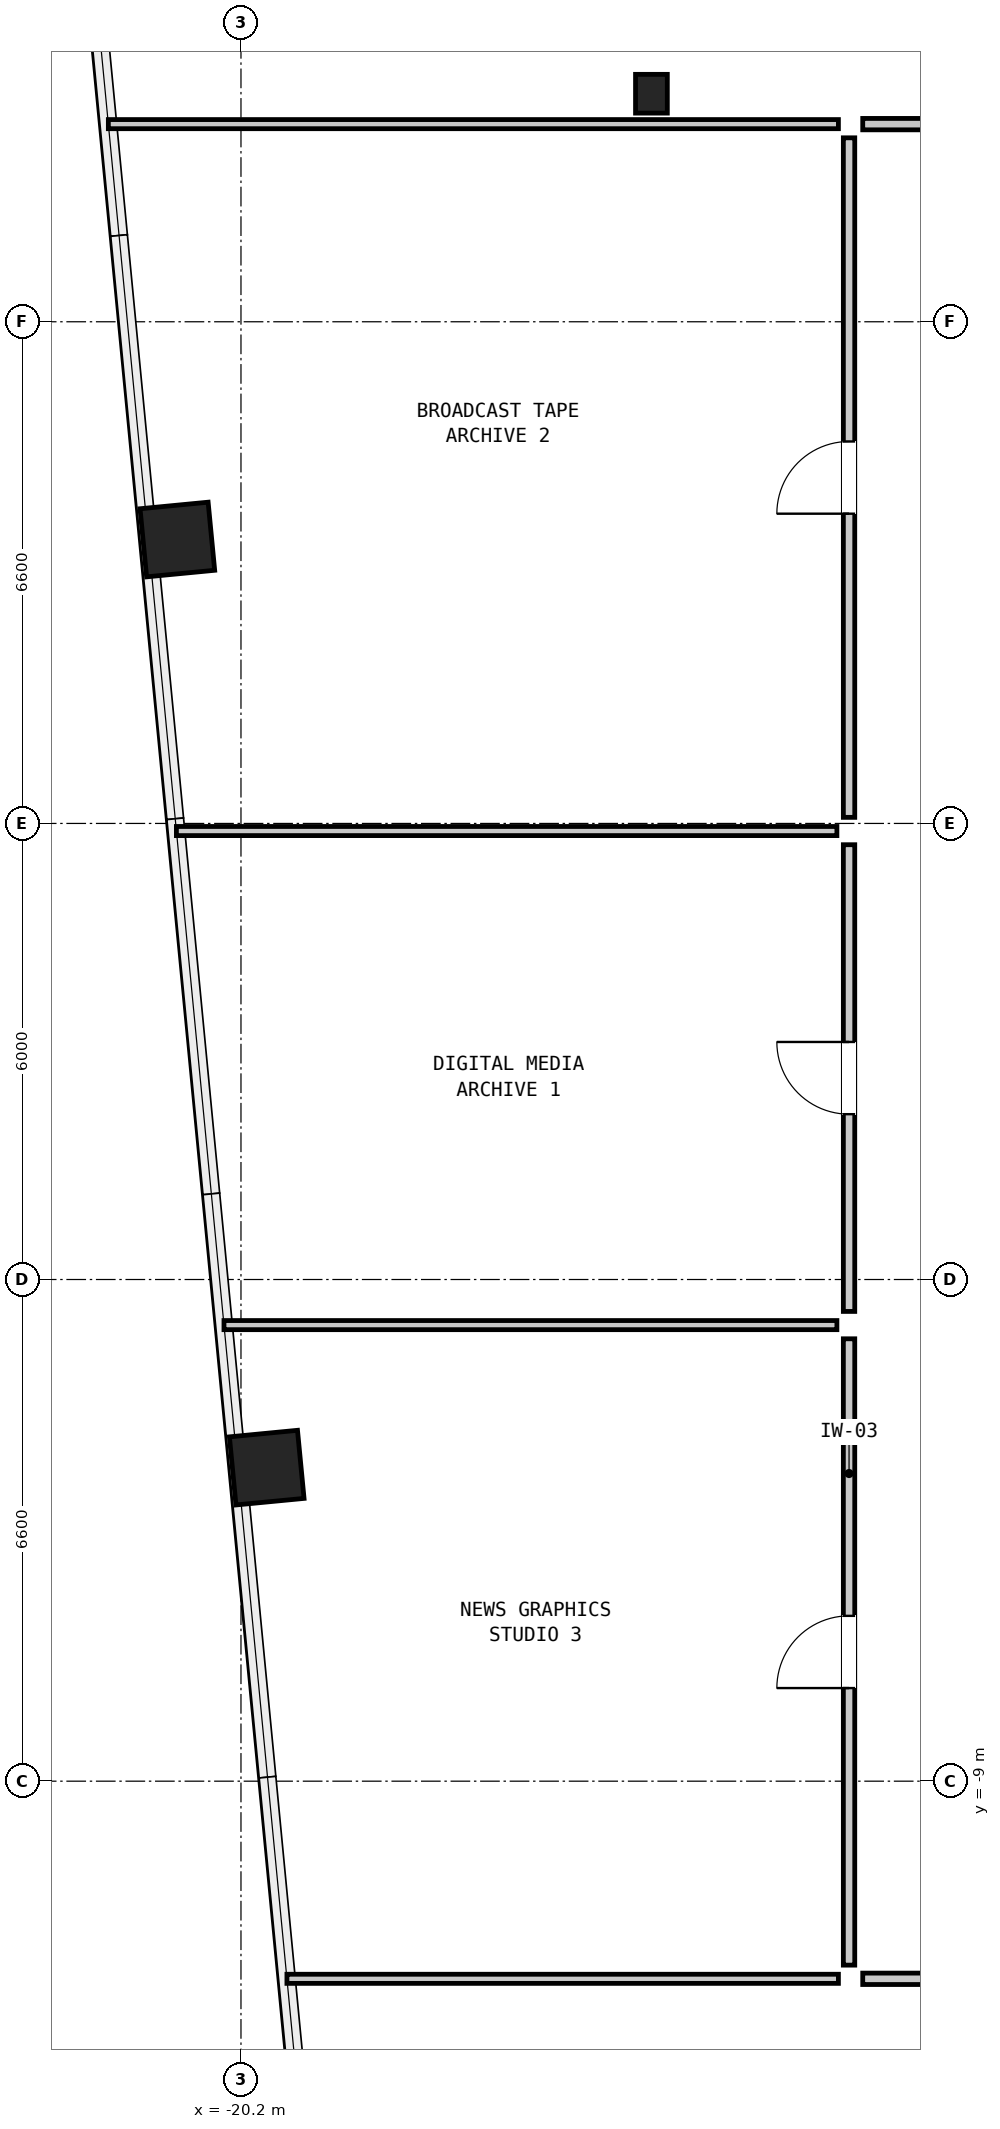
"""IFC4 building model, lengths in metres.
Left out: names, types, materials, properties, quantities, classifications, styles, units other than length and angle.
Written with IfcOpenShell. Run it as: python <this file> out.ifc"""

import sys

from ifc_helpers import new_model, si_unit, direction, frame, frame_2d, origin, origin_2d, place, context, subcontext, project, spatial, rectangle, hollow_rectangle, i_section, extrude, element, fill, save


model = new_model("IFC4")
c1 = context("Model", 3, precision=1e-05, world=origin(), true_north=direction((0.0, 1.0)))
c2 = subcontext(c1, "Body", "Model", "MODEL_VIEW")
j1 = project(units=[si_unit("LENGTHUNIT", "METRE"), si_unit("PLANEANGLEUNIT", "RADIAN")], contexts=[c1])
p1 = place(None, origin())
s1 = spatial("IfcSite", under=j1, at=p1, CompositionType="ELEMENT")
p2 = place(p1, origin())
s2 = spatial("IfcBuilding", under=s1, at=p2, CompositionType="ELEMENT")
p3 = place(p2, frame((0.0, 0.0, 87.75)))
s3 = spatial("IfcBuildingStorey", under=s2, at=p3, CompositionType="ELEMENT", Elevation=87.75)
for number, where, z_axis, x_axis in (
    (1, (-21.037, 7.335, 0.0), (0.0, 0.0, 1.0), (-0.096, 0.995, 0.0)),
    (2, (-19.861, -4.875, 0.0), (0.0, 0.0, 1.0), (-0.096, 0.995, 0.0)),
):
    element("IfcColumn", number, at=place(p3, frame(where, z_axis=z_axis, x_axis=x_axis)), inside=s3, PredefinedType="COLUMN", context=c2, shape_type="SweptSolid", body=[
        extrude(hollow_rectangle(XDim=0.9, YDim=0.9, WallThickness=0.055, at=origin_2d()), origin(), (0.0, 0.0, 1.0), 3.05),
    ])
p4 = place(p3, frame((-14.8, 13.2, 0.0), z_axis=(0.0, 0.0, 1.0), x_axis=(1.0, 0.0, 0.0)))
e3 = element("IfcColumn", 3, at=p4, inside=s3, PredefinedType="COLUMN", context=c2, shape_type="SweptSolid", body=[
    extrude(i_section(OverallWidth=0.418, OverallDepth=0.51, WebThickness=0.042, FlangeThickness=0.068, at=origin_2d()), origin(), (0.0, 0.0, 1.0), 3.05),
])
p5 = place(p3, frame((-21.945, 12.8, 0.0), z_axis=(0.0, 0.0, 1.0), x_axis=(1.0, 0.0, 0.0)))
e4 = element("IfcWall", 4, at=p5, inside=s3, PredefinedType="PARTITIONING", context=c2, shape_type="SweptSolid", body=[
    extrude(rectangle(XDim=9.605, YDim=0.12, at=frame_2d((4.802, 0.0))), origin(), (0.0, 0.0, 1.0), 2.83),
])
p6 = place(p3, frame((-19.595, -11.6, 0.0), z_axis=(0.0, 0.0, 1.0), x_axis=(1.0, 0.0, 0.0)))
e5 = element("IfcWall", 5, at=p6, inside=s3, PredefinedType="PARTITIONING", context=c2, shape_type="SweptSolid", body=[
    extrude(rectangle(XDim=7.255, YDim=0.12, at=frame_2d((3.628, 0.0))), origin(), (0.0, 0.0, 1.0), 2.274),
])
p7 = place(p3, frame((-20.424, -3.0, 0.0), z_axis=(0.0, 0.0, 1.0), x_axis=(1.0, 0.0, 0.0)))
e6 = element("IfcWall", 6, at=p7, inside=s3, PredefinedType="PARTITIONING", context=c2, shape_type="SweptSolid", body=[
    extrude(rectangle(XDim=8.063, YDim=0.12, at=frame_2d((4.032, 0.0))), origin(), (0.0, 0.0, 1.0), 1.799),
])
p8 = place(p3, frame((-21.049, 3.5, 0.0), z_axis=(0.0, 0.0, 1.0), x_axis=(1.0, 0.0, 0.0)))
e7 = element("IfcWall", 7, at=p8, inside=s3, PredefinedType="PARTITIONING", context=c2, shape_type="SweptSolid", body=[
    extrude(rectangle(XDim=8.689, YDim=0.12, at=frame_2d((4.345, 0.0))), origin(), (0.0, 0.0, 1.0), 1.799),
])
p9 = place(p3, frame((-12.02, 12.8, 0.0), z_axis=(0.0, 0.0, 1.0), x_axis=(1.0, 0.0, 0.0)))
e8 = element("IfcWall", 8, at=p9, inside=s3, PredefinedType="PARTITIONING", context=c2, shape_type="SweptSolid", body=[
    extrude(rectangle(XDim=5.34, YDim=0.15, at=frame_2d((2.67, 0.0))), origin(), (0.0, 0.0, 1.0), 2.83),
])
p10 = place(p9, frame((2.995, 0.0, 0.0)))
e9 = element("IfcOpeningElement", 9, at=p10, cuts=e8, PredefinedType="OPENING", context=c2, shape_type="SweptSolid", body=[
    extrude(rectangle(XDim=0.95, YDim=2.1, at=frame_2d((0.475, 1.05))), frame((0.0, 0.087, 0.0), z_axis=(0.0, -1.0, 0.0), x_axis=(1.0, 0.0, 0.0)), (0.0, 0.0, 1.0), 0.174),
])
p11 = place(p3, frame((-12.02, -11.6, 0.0), z_axis=(0.0, 0.0, 1.0), x_axis=(1.0, 0.0, 0.0)))
e10 = element("IfcWall", 10, at=p11, inside=s3, PredefinedType="PARTITIONING", context=c2, shape_type="SweptSolid", body=[
    extrude(rectangle(XDim=5.84, YDim=0.15, at=frame_2d((2.92, 0.0))), origin(), (0.0, 0.0, 1.0), 2.274),
])
p12 = place(p11, frame((3.045, 0.0, 0.0)))
e11 = element("IfcOpeningElement", 11, at=p12, cuts=e10, PredefinedType="OPENING", context=c2, shape_type="SweptSolid", body=[
    extrude(rectangle(XDim=0.95, YDim=2.1, at=frame_2d((0.475, 1.05))), frame((0.0, 0.087, 0.0), z_axis=(0.0, -1.0, 0.0), x_axis=(1.0, 0.0, 0.0)), (0.0, 0.0, 1.0), 0.174),
])
p13 = place(p3, frame((-12.2, -11.42, 0.0), z_axis=(0.0, 0.0, 1.0), x_axis=(0.0, 1.0, 0.0)))
e12 = element("IfcWall", 12, at=p13, inside=s3, PredefinedType="PARTITIONING", context=c2, shape_type="SweptSolid", body=[
    extrude(rectangle(XDim=8.24, YDim=0.15, at=frame_2d((4.12, 0.0))), origin(), (0.0, 0.0, 1.0), 2.83),
])
p14 = place(p13, frame((3.645, 0.0, 0.0)))
e13 = element("IfcOpeningElement", 13, at=p14, cuts=e12, PredefinedType="OPENING", context=c2, shape_type="SweptSolid", body=[
    extrude(rectangle(XDim=0.95, YDim=2.1, at=frame_2d((0.475, 1.05))), frame((0.0, 0.087, 0.0), z_axis=(0.0, -1.0, 0.0), x_axis=(1.0, 0.0, 0.0)), (0.0, 0.0, 1.0), 0.174),
])
p15 = place(p3, frame((-12.2, -2.82, 0.0), z_axis=(0.0, 0.0, 1.0), x_axis=(0.0, 1.0, 0.0)))
e14 = element("IfcWall", 14, at=p15, inside=s3, PredefinedType="PARTITIONING", context=c2, shape_type="SweptSolid", body=[
    extrude(rectangle(XDim=6.14, YDim=0.15, at=frame_2d((3.07, 0.0))), origin(), (0.0, 0.0, 1.0), 2.83),
])
p16 = place(p15, frame((2.595, 0.0, 0.0)))
e15 = element("IfcOpeningElement", 15, at=p16, cuts=e14, PredefinedType="OPENING", context=c2, shape_type="SweptSolid", body=[
    extrude(rectangle(XDim=0.95, YDim=2.1, at=frame_2d((0.475, 1.05))), frame((0.0, 0.087, 0.0), z_axis=(0.0, -1.0, 0.0), x_axis=(1.0, 0.0, 0.0)), (0.0, 0.0, 1.0), 0.174),
])
p17 = place(p3, frame((-12.2, 3.68, 0.0), z_axis=(0.0, 0.0, 1.0), x_axis=(0.0, 1.0, 0.0)))
e16 = element("IfcWall", 16, at=p17, inside=s3, PredefinedType="PARTITIONING", context=c2, shape_type="SweptSolid", body=[
    extrude(rectangle(XDim=8.94, YDim=0.15, at=frame_2d((4.47, 0.0))), origin(), (0.0, 0.0, 1.0), 2.83),
])
p18 = place(p17, frame((3.995, 0.0, 0.0)))
e17 = element("IfcOpeningElement", 17, at=p18, cuts=e16, PredefinedType="OPENING", context=c2, shape_type="SweptSolid", body=[
    extrude(rectangle(XDim=0.95, YDim=2.1, at=frame_2d((0.475, 1.05))), frame((0.0, 0.087, 0.0), z_axis=(0.0, -1.0, 0.0), x_axis=(1.0, 0.0, 0.0)), (0.0, 0.0, 1.0), 0.174),
])
p19 = place(p14, origin())
e18 = element("IfcDoor", 18, at=p19, inside=s3, OperationType="SINGLE_SWING_LEFT", PredefinedType="DOOR", context=c2, shape_type="SweptSolid", body=[
    extrude(rectangle(XDim=0.95, YDim=2.1, at=frame_2d((0.475, 1.05))), frame((0.0, 0.025, 0.0), z_axis=(0.0, -1.0, 0.0), x_axis=(1.0, 0.0, 0.0)), (0.0, 0.0, 1.0), 0.05),
])
fill(e13, e18)
p20 = place(p16, origin())
e19 = element("IfcDoor", 19, at=p20, inside=s3, OperationType="SINGLE_SWING_RIGHT", PredefinedType="DOOR", context=c2, shape_type="SweptSolid", body=[
    extrude(rectangle(XDim=0.95, YDim=2.1, at=frame_2d((0.475, 1.05))), frame((0.0, 0.025, 0.0), z_axis=(0.0, -1.0, 0.0), x_axis=(1.0, 0.0, 0.0)), (0.0, 0.0, 1.0), 0.05),
])
fill(e15, e19)
p21 = place(p18, origin())
e20 = element("IfcDoor", 20, at=p21, inside=s3, OperationType="SINGLE_SWING_LEFT", PredefinedType="DOOR", context=c2, shape_type="SweptSolid", body=[
    extrude(rectangle(XDim=0.95, YDim=2.1, at=frame_2d((0.475, 1.05))), frame((0.0, 0.025, 0.0), z_axis=(0.0, -1.0, 0.0), x_axis=(1.0, 0.0, 0.0)), (0.0, 0.0, 1.0), 0.05),
])
fill(e17, e20)
save(model, sys.argv[1])
